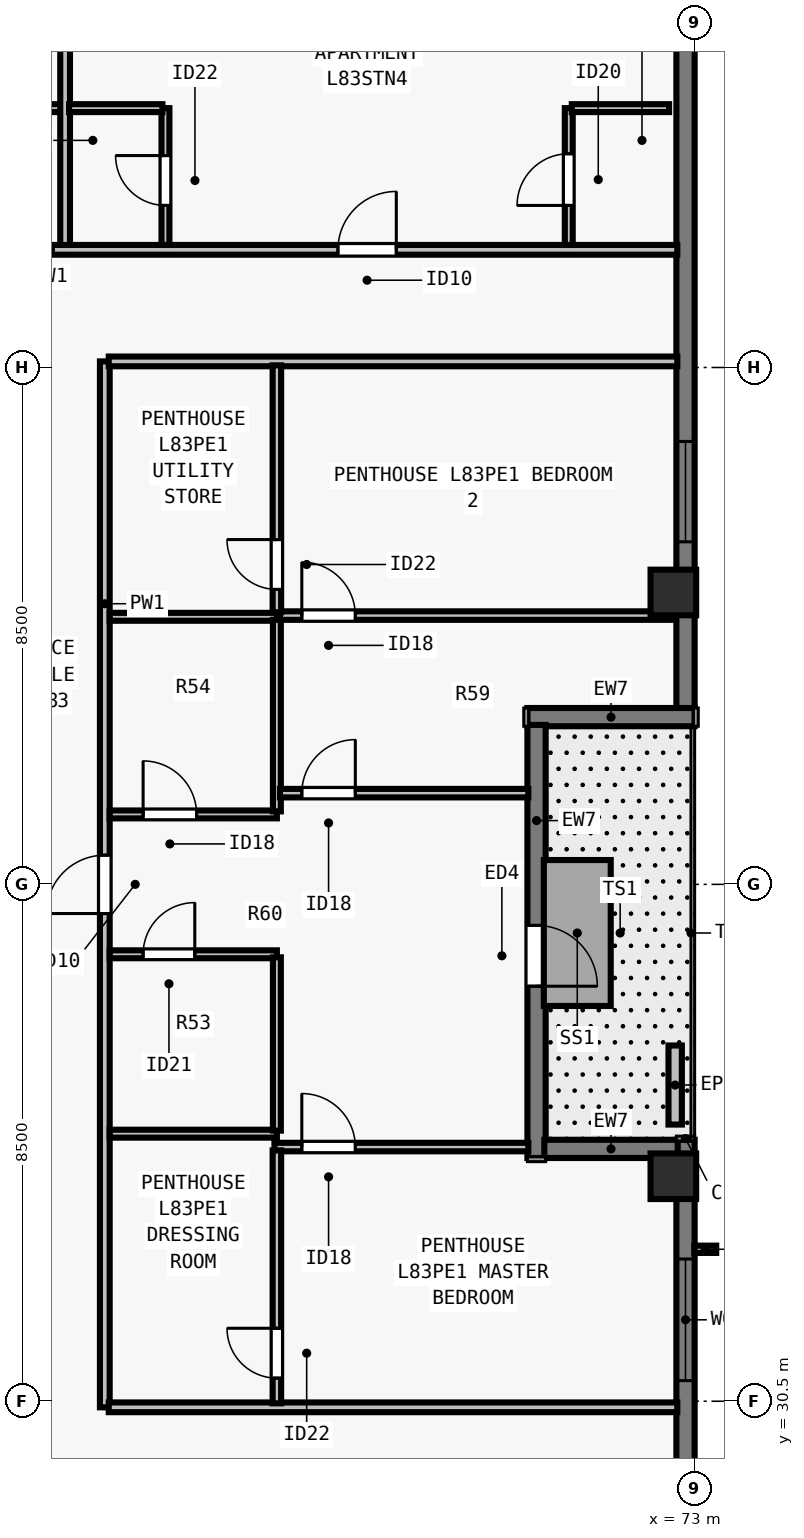
"""IFC4 building model, lengths in metres.
Left out: names, types, materials, properties, quantities, classifications, styles, units other than length and angle.
Written with IfcOpenShell. Run it as: python <this file> out.ifc"""

import sys

from ifc_helpers import new_model, si_unit, direction, frame, frame_2d, origin, origin_2d, place, context, subcontext, project, spatial, rectangle, extrude, element, fill, save


model = new_model("IFC4")
c1 = context("Model", 3, precision=1e-05, world=origin(), true_north=direction((0.0, 1.0)))
c2 = subcontext(c1, "Body", "Model", "MODEL_VIEW")
j1 = project(units=[si_unit("LENGTHUNIT", "METRE"), si_unit("PLANEANGLEUNIT", "RADIAN")], contexts=[c1])
p1 = place(None, origin())
s1 = spatial("IfcSite", under=j1, at=p1, CompositionType="ELEMENT")
p2 = place(p1, origin())
s2 = spatial("IfcBuilding", under=s1, at=p2, CompositionType="ELEMENT")
p3 = place(p2, frame((0.0, 0.0, 301.5)))
s3 = spatial("IfcBuildingStorey", under=s2, at=p3, CompositionType="ELEMENT", Elevation=301.5)
for number, where, z_axis, x_axis in (
    (1, (72.65, 34.2, 0.0), (0.0, 0.0, 1.0), (0.0, 1.0, 0.0)),
    (2, (72.65, 43.8, 0.0), (0.0, 0.0, 1.0), (0.0, 1.0, 0.0)),
):
    element("IfcColumn", number, at=place(p3, frame(where, z_axis=z_axis, x_axis=x_axis)), inside=s3, PredefinedType="COLUMN", context=c2, shape_type="SweptSolid", body=[
        extrude(rectangle(XDim=0.75, YDim=0.75, at=origin_2d()), origin(), (0.0, 0.0, 1.0), 3.5),
    ])
p4 = place(p3, frame((72.85, 34.8, 0.0), z_axis=(0.0, 0.0, 1.0), x_axis=(0.0, -1.0, 0.0)))
e3 = element("IfcWall", 3, at=p4, inside=s3, PredefinedType="SOLIDWALL", context=c2, shape_type="SweptSolid", body=[
    extrude(rectangle(XDim=11.022, YDim=0.3, at=frame_2d((5.511, 0.0))), origin(), (0.0, 0.0, 1.0), 3.29),
])
p5 = place(p4, frame((1.961, 0.0, 0.8)))
e4 = element("IfcOpeningElement", 4, at=p5, cuts=e3, PredefinedType="OPENING", context=c2, shape_type="SweptSolid", body=[
    extrude(rectangle(XDim=2.0, YDim=1.758, at=frame_2d((1.0, 0.879))), frame((0.0, 0.16, 0.0), z_axis=(0.0, -1.0, 0.0), x_axis=(1.0, 0.0, 0.0)), (0.0, 0.0, 1.0), 0.32),
])
p6 = place(p3, frame((72.85, 54.5, 0.0), z_axis=(0.0, 0.0, 1.0), x_axis=(0.0, -1.0, 0.0)))
e5 = element("IfcWall", 5, at=p6, inside=s3, PredefinedType="SOLIDWALL", context=c2, shape_type="SweptSolid", body=[
    extrude(rectangle(XDim=12.622, YDim=0.3, at=frame_2d((6.311, 0.0))), origin(), (0.0, 0.0, 1.0), 3.29),
])
p7 = place(p6, frame((8.217, 0.0, 0.8)))
e6 = element("IfcOpeningElement", 6, at=p7, cuts=e5, PredefinedType="OPENING", context=c2, shape_type="SweptSolid", body=[
    extrude(rectangle(XDim=1.65, YDim=1.758, at=frame_2d((0.825, 0.879))), frame((0.0, 0.16, 0.0), z_axis=(0.0, -1.0, 0.0), x_axis=(1.0, 0.0, 0.0)), (0.0, 0.0, 1.0), 0.32),
])
p8 = place(p3, frame((73.0, 41.75, 0.0), z_axis=(0.0, 0.0, 1.0), x_axis=(-1.0, 0.0, 0.0)))
e7 = element("IfcWall", 7, at=p8, inside=s3, PredefinedType="SOLIDWALL", context=c2, shape_type="SweptSolid", body=[
    extrude(rectangle(XDim=2.75, YDim=0.3, at=frame_2d((1.375, 0.0))), origin(), (0.0, 0.0, 1.0), 3.29),
])
p9 = place(p3, frame((70.4, 41.622, 0.0), z_axis=(0.0, 0.0, 1.0), x_axis=(0.0, -1.0, 0.0)))
e8 = element("IfcWall", 8, at=p9, inside=s3, PredefinedType="SOLIDWALL", context=c2, shape_type="SweptSolid", body=[
    extrude(rectangle(XDim=7.122, YDim=0.3, at=frame_2d((3.561, 0.0))), origin(), (0.0, 0.0, 1.0), 3.29),
])
p10 = place(p9, frame((3.297, 0.0, 0.0)))
e9 = element("IfcOpeningElement", 9, at=p10, cuts=e8, PredefinedType="OPENING", context=c2, shape_type="SweptSolid", body=[
    extrude(rectangle(XDim=1.0, YDim=2.15, at=frame_2d((0.5, 1.075))), frame((0.0, 0.16, 0.0), z_axis=(0.0, -1.0, 0.0), x_axis=(1.0, 0.0, 0.0)), (0.0, 0.0, 1.0), 0.32),
])
p11 = place(p3, frame((70.528, 34.65, 0.0), z_axis=(0.0, 0.0, 1.0), x_axis=(1.0, 0.0, 0.0)))
e10 = element("IfcWall", 10, at=p11, inside=s3, PredefinedType="SOLIDWALL", context=c2, shape_type="SweptSolid", body=[
    extrude(rectangle(XDim=2.194, YDim=0.3, at=frame_2d((1.097, 0.0))), origin(), (0.0, 0.0, 1.0), 3.29),
])
p12 = place(p3, frame((72.68, 35.05, 0.0), z_axis=(0.0, 0.0, 1.0), x_axis=(0.0, 1.0, 0.0)))
e11 = element("IfcWall", 11, at=p12, inside=s3, PredefinedType="PARAPET", context=c2, shape_type="SweptSolid", body=[
    extrude(rectangle(XDim=1.3, YDim=0.22, at=frame_2d((0.65, 0.0))), origin(), (0.0, 0.0, 1.0), 0.55),
])
p13 = place(p3, frame((31.285, 49.435, 0.0), z_axis=(0.0, 0.0, 1.0), x_axis=(1.0, 0.0, 0.0)))
e12 = element("IfcWall", 12, at=p13, inside=s3, PredefinedType="PARTITIONING", context=c2, shape_type="SweptSolid", body=[
    extrude(rectangle(XDim=41.43, YDim=0.16, at=frame_2d((20.715, 0.0))), origin(), (0.0, 0.0, 1.0), 3.009),
])
p14 = place(p13, frame((4.979, 0.0, 0.0)))
e13 = element("IfcOpeningElement", 13, at=p14, cuts=e12, PredefinedType="OPENING", context=c2, shape_type="SweptSolid", body=[
    extrude(rectangle(XDim=0.96, YDim=2.18, at=frame_2d((0.48, 1.09))), frame((0.0, 0.09, 0.0), z_axis=(0.0, -1.0, 0.0), x_axis=(1.0, 0.0, 0.0)), (0.0, 0.0, 1.0), 0.18),
])
p15 = place(p13, frame((15.145, 0.0, 0.0)))
e14 = element("IfcOpeningElement", 14, at=p15, cuts=e12, PredefinedType="OPENING", context=c2, shape_type="SweptSolid", body=[
    extrude(rectangle(XDim=0.96, YDim=2.18, at=frame_2d((0.48, 1.09))), frame((0.0, 0.09, 0.0), z_axis=(0.0, -1.0, 0.0), x_axis=(1.0, 0.0, 0.0)), (0.0, 0.0, 1.0), 0.18),
])
p16 = place(p13, frame((25.435, 0.0, 0.0)))
e15 = element("IfcOpeningElement", 15, at=p16, cuts=e12, PredefinedType="OPENING", context=c2, shape_type="SweptSolid", body=[
    extrude(rectangle(XDim=0.96, YDim=2.18, at=frame_2d((0.48, 1.09))), frame((0.0, 0.09, 0.0), z_axis=(0.0, -1.0, 0.0), x_axis=(1.0, 0.0, 0.0)), (0.0, 0.0, 1.0), 0.18),
])
p17 = place(p13, frame((35.849, 0.0, 0.0)))
e16 = element("IfcOpeningElement", 16, at=p17, cuts=e12, PredefinedType="OPENING", context=c2, shape_type="SweptSolid", body=[
    extrude(rectangle(XDim=0.96, YDim=2.18, at=frame_2d((0.48, 1.09))), frame((0.0, 0.09, 0.0), z_axis=(0.0, -1.0, 0.0), x_axis=(1.0, 0.0, 0.0)), (0.0, 0.0, 1.0), 0.18),
])
p18 = place(p3, frame((63.3, 30.4, 0.0), z_axis=(0.0, 0.0, 1.0), x_axis=(0.0, 1.0, 0.0)))
e17 = element("IfcWall", 17, at=p18, inside=s3, PredefinedType="PARTITIONING", context=c2, shape_type="SweptSolid", body=[
    extrude(rectangle(XDim=17.2, YDim=0.16, at=frame_2d((8.6, 0.0))), origin(), (0.0, 0.0, 1.0), 3.29),
])
p19 = place(p18, frame((8.12, 0.0, 0.0)))
e18 = element("IfcOpeningElement", 18, at=p19, cuts=e17, PredefinedType="OPENING", context=c2, shape_type="SweptSolid", body=[
    extrude(rectangle(XDim=0.96, YDim=2.18, at=frame_2d((0.48, 1.09))), frame((0.0, 0.09, 0.0), z_axis=(0.0, -1.0, 0.0), x_axis=(1.0, 0.0, 0.0)), (0.0, 0.0, 1.0), 0.18),
])
for number, where, z_axis, x_axis in (
    (19, (63.365, 30.4, 0.0), (0.0, 0.0, 1.0), (1.0, 0.0, 0.0)),
    (20, (63.365, 47.6, 0.0), (0.0, 0.0, 1.0), (1.0, 0.0, 0.0)),
):
    element("IfcWall", number, at=place(p3, frame(where, z_axis=z_axis, x_axis=x_axis)), inside=s3, PredefinedType="PARTITIONING", context=c2, shape_type="SweptSolid", body=[
        extrude(rectangle(XDim=9.35, YDim=0.16, at=frame_2d((4.675, 0.0))), origin(), (0.0, 0.0, 1.0), 3.29),
    ])
p20 = place(p3, frame((61.048, 51.765, 0.0), z_axis=(0.0, 0.0, 1.0), x_axis=(1.0, 0.0, 0.0)))
e21 = element("IfcWall", 21, at=p20, inside=s3, PredefinedType="PLUMBINGWALL", context=c2, shape_type="SweptSolid", body=[
    extrude(rectangle(XDim=1.6, YDim=0.13, at=frame_2d((0.8, 0.0))), origin(), (0.0, 0.0, 1.0), 3.29),
])
p21 = place(p3, frame((62.647, 49.515, 0.0), z_axis=(0.0, 0.0, 1.0), x_axis=(0.0, 1.0, 0.0)))
e22 = element("IfcWall", 22, at=p21, inside=s3, PredefinedType="PARTITIONING", context=c2, shape_type="SweptSolid", body=[
    extrude(rectangle(XDim=10.185, YDim=0.16, at=frame_2d((5.093, 0.0))), origin(), (0.0, 0.0, 1.0), 2.653),
])
p22 = place(p3, frame((64.298, 49.515, 0.0), z_axis=(0.0, 0.0, 1.0), x_axis=(0.0, 1.0, 0.0)))
e23 = element("IfcWall", 23, at=p22, inside=s3, PredefinedType="PLUMBINGWALL", context=c2, shape_type="SweptSolid", body=[
    extrude(rectangle(XDim=2.25, YDim=0.13, at=frame_2d((1.125, 0.0))), origin(), (0.0, 0.0, 1.0), 3.29),
])
p23 = place(p22, frame((0.65, 0.0, 0.0)))
e24 = element("IfcOpeningElement", 24, at=p23, cuts=e23, PredefinedType="OPENING", context=c2, shape_type="SweptSolid", body=[
    extrude(rectangle(XDim=0.82, YDim=2.1, at=frame_2d((0.41, 1.05))), frame((0.0, 0.075, 0.0), z_axis=(0.0, -1.0, 0.0), x_axis=(1.0, 0.0, 0.0)), (0.0, 0.0, 1.0), 0.15),
])
p24 = place(p3, frame((62.712, 51.765, 0.0), z_axis=(0.0, 0.0, 1.0), x_axis=(1.0, 0.0, 0.0)))
e25 = element("IfcWall", 25, at=p24, inside=s3, PredefinedType="PLUMBINGWALL", context=c2, shape_type="SweptSolid", body=[
    extrude(rectangle(XDim=1.535, YDim=0.13, at=frame_2d((0.768, 0.0))), origin(), (0.0, 0.0, 1.0), 3.29),
])
p25 = place(p3, frame((70.93, 49.515, 0.0), z_axis=(0.0, 0.0, 1.0), x_axis=(0.0, 1.0, 0.0)))
e26 = element("IfcWall", 26, at=p25, inside=s3, PredefinedType="PLUMBINGWALL", context=c2, shape_type="SweptSolid", body=[
    extrude(rectangle(XDim=2.25, YDim=0.13, at=frame_2d((1.125, 0.0))), origin(), (0.0, 0.0, 1.0), 3.29),
])
p26 = place(p25, frame((0.65, 0.0, 0.0)))
e27 = element("IfcOpeningElement", 27, at=p26, cuts=e26, PredefinedType="OPENING", context=c2, shape_type="SweptSolid", body=[
    extrude(rectangle(XDim=0.85, YDim=2.1, at=frame_2d((0.425, 1.05))), frame((0.0, 0.075, 0.0), z_axis=(0.0, -1.0, 0.0), x_axis=(1.0, 0.0, 0.0)), (0.0, 0.0, 1.0), 0.15),
])
p27 = place(p3, frame((70.98, 51.765, 0.0), z_axis=(0.0, 0.0, 1.0), x_axis=(1.0, 0.0, 0.0)))
e28 = element("IfcWall", 28, at=p27, inside=s3, PredefinedType="PLUMBINGWALL", context=c2, shape_type="SweptSolid", body=[
    extrude(rectangle(XDim=1.6, YDim=0.13, at=frame_2d((0.8, 0.0))), origin(), (0.0, 0.0, 1.0), 3.29),
])
p28 = place(p3, frame((63.38, 34.9, 0.0), z_axis=(0.0, 0.0, 1.0), x_axis=(1.0, 0.0, 0.0)))
e29 = element("IfcWall", 29, at=p28, inside=s3, PredefinedType="PLUMBINGWALL", context=c2, shape_type="SweptSolid", body=[
    extrude(rectangle(XDim=2.75, YDim=0.13, at=frame_2d((1.375, 0.0))), origin(), (0.0, 0.0, 1.0), 3.29),
])
p29 = place(p3, frame((63.38, 37.85, 0.0), z_axis=(0.0, 0.0, 1.0), x_axis=(1.0, 0.0, 0.0)))
e30 = element("IfcWall", 30, at=p29, inside=s3, PredefinedType="PLUMBINGWALL", context=c2, shape_type="SweptSolid", body=[
    extrude(rectangle(XDim=2.75, YDim=0.13, at=frame_2d((1.375, 0.0))), origin(), (0.0, 0.0, 1.0), 3.29),
])
p30 = place(p29, frame((0.55, 0.0, 0.0)))
e31 = element("IfcOpeningElement", 31, at=p30, cuts=e30, PredefinedType="OPENING", context=c2, shape_type="SweptSolid", body=[
    extrude(rectangle(XDim=0.85, YDim=2.08, at=frame_2d((0.425, 1.04))), frame((0.0, 0.075, 0.0), z_axis=(0.0, -1.0, 0.0), x_axis=(1.0, 0.0, 0.0)), (0.0, 0.0, 1.0), 0.15),
])
p31 = place(p3, frame((66.13, 34.95, 0.0), z_axis=(0.0, 0.0, 1.0), x_axis=(0.0, 1.0, 0.0)))
e32 = element("IfcWall", 32, at=p31, inside=s3, PredefinedType="PLUMBINGWALL", context=c2, shape_type="SweptSolid", body=[
    extrude(rectangle(XDim=2.85, YDim=0.13, at=frame_2d((1.425, 0.0))), origin(), (0.0, 0.0, 1.0), 3.29),
])
p32 = place(p3, frame((63.38, 43.4, 0.0), z_axis=(0.0, 0.0, 1.0), x_axis=(1.0, 0.0, 0.0)))
e33 = element("IfcWall", 33, at=p32, inside=s3, PredefinedType="PLUMBINGWALL", context=c2, shape_type="SweptSolid", body=[
    extrude(rectangle(XDim=2.75, YDim=0.13, at=frame_2d((1.375, 0.0))), origin(), (0.0, 0.0, 1.0), 3.29),
])
p33 = place(p3, frame((63.38, 40.15, 0.0), z_axis=(0.0, 0.0, 1.0), x_axis=(1.0, 0.0, 0.0)))
e34 = element("IfcWall", 34, at=p33, inside=s3, PredefinedType="PLUMBINGWALL", context=c2, shape_type="SweptSolid", body=[
    extrude(rectangle(XDim=2.75, YDim=0.13, at=frame_2d((1.375, 0.0))), origin(), (0.0, 0.0, 1.0), 3.29),
])
p34 = place(p33, frame((0.55, 0.0, 0.0)))
e35 = element("IfcOpeningElement", 35, at=p34, cuts=e34, PredefinedType="OPENING", context=c2, shape_type="SweptSolid", body=[
    extrude(rectangle(XDim=0.88, YDim=2.1, at=frame_2d((0.44, 1.05))), frame((0.0, 0.075, 0.0), z_axis=(0.0, -1.0, 0.0), x_axis=(1.0, 0.0, 0.0)), (0.0, 0.0, 1.0), 0.15),
])
p35 = place(p3, frame((66.13, 40.2, 0.0), z_axis=(0.0, 0.0, 1.0), x_axis=(0.0, 1.0, 0.0)))
e36 = element("IfcWall", 36, at=p35, inside=s3, PredefinedType="PLUMBINGWALL", context=c2, shape_type="SweptSolid", body=[
    extrude(rectangle(XDim=3.15, YDim=0.13, at=frame_2d((1.575, 0.0))), origin(), (0.0, 0.0, 1.0), 3.29),
])
p36 = place(p3, frame((66.09, 34.68, 0.0), z_axis=(0.0, 0.0, 1.0), x_axis=(1.0, 0.0, 0.0)))
e37 = element("IfcWall", 37, at=p36, inside=s3, PredefinedType="PARTITIONING", context=c2, shape_type="SweptSolid", body=[
    extrude(rectangle(XDim=4.175, YDim=0.14, at=frame_2d((2.087, 0.0))), origin(), (0.0, 0.0, 1.0), 3.29),
])
p37 = place(p36, frame((0.45, 0.0, 0.0)))
e38 = element("IfcOpeningElement", 38, at=p37, cuts=e37, PredefinedType="OPENING", context=c2, shape_type="SweptSolid", body=[
    extrude(rectangle(XDim=0.88, YDim=2.1, at=frame_2d((0.44, 1.05))), frame((0.0, 0.08, 0.0), z_axis=(0.0, -1.0, 0.0), x_axis=(1.0, 0.0, 0.0)), (0.0, 0.0, 1.0), 0.16),
])
p38 = place(p3, frame((66.13, 30.465, 0.0), z_axis=(0.0, 0.0, 1.0), x_axis=(0.0, 1.0, 0.0)))
e39 = element("IfcWall", 39, at=p38, inside=s3, PredefinedType="PARTITIONING", context=c2, shape_type="SweptSolid", body=[
    extrude(rectangle(XDim=4.16, YDim=0.14, at=frame_2d((2.08, 0.0))), origin(), (0.0, 0.0, 1.0), 3.29),
])
p39 = place(p38, frame((0.415, 0.0, 0.0)))
e40 = element("IfcOpeningElement", 40, at=p39, cuts=e39, PredefinedType="OPENING", context=c2, shape_type="SweptSolid", body=[
    extrude(rectangle(XDim=0.82, YDim=2.1, at=frame_2d((0.41, 1.05))), frame((0.0, 0.08, 0.0), z_axis=(0.0, -1.0, 0.0), x_axis=(1.0, 0.0, 0.0)), (0.0, 0.0, 1.0), 0.16),
])
p40 = place(p3, frame((66.18, 43.42, 0.0), z_axis=(0.0, 0.0, 1.0), x_axis=(1.0, 0.0, 0.0)))
e41 = element("IfcWall", 41, at=p40, inside=s3, PredefinedType="PARTITIONING", context=c2, shape_type="SweptSolid", body=[
    extrude(rectangle(XDim=6.44, YDim=0.14, at=frame_2d((3.22, 0.0))), origin(), (0.0, 0.0, 1.0), 3.29),
])
p41 = place(p40, frame((0.36, 0.0, 0.0)))
e42 = element("IfcOpeningElement", 42, at=p41, cuts=e41, PredefinedType="OPENING", context=c2, shape_type="SweptSolid", body=[
    extrude(rectangle(XDim=0.88, YDim=2.1, at=frame_2d((0.44, 1.05))), frame((0.0, 0.08, 0.0), z_axis=(0.0, -1.0, 0.0), x_axis=(1.0, 0.0, 0.0)), (0.0, 0.0, 1.0), 0.16),
])
p42 = place(p3, frame((66.13, 43.475, 0.0), z_axis=(0.0, 0.0, 1.0), x_axis=(0.0, 1.0, 0.0)))
e43 = element("IfcWall", 43, at=p42, inside=s3, PredefinedType="PARTITIONING", context=c2, shape_type="SweptSolid", body=[
    extrude(rectangle(XDim=4.06, YDim=0.14, at=frame_2d((2.03, 0.0))), origin(), (0.0, 0.0, 1.0), 3.29),
])
p43 = place(p42, frame((0.375, 0.0, 0.0)))
e44 = element("IfcOpeningElement", 44, at=p43, cuts=e43, PredefinedType="OPENING", context=c2, shape_type="SweptSolid", body=[
    extrude(rectangle(XDim=0.82, YDim=2.1, at=frame_2d((0.41, 1.05))), frame((0.0, 0.08, 0.0), z_axis=(0.0, -1.0, 0.0), x_axis=(1.0, 0.0, 0.0)), (0.0, 0.0, 1.0), 0.16),
])
p44 = place(p3, frame((66.18, 40.5, 0.0), z_axis=(0.0, 0.0, 1.0), x_axis=(1.0, 0.0, 0.0)))
e45 = element("IfcWall", 45, at=p44, inside=s3, PredefinedType="PARTITIONING", context=c2, shape_type="SweptSolid", body=[
    extrude(rectangle(XDim=4.085, YDim=0.14, at=frame_2d((2.042, 0.0))), origin(), (0.0, 0.0, 1.0), 3.29),
])
p45 = place(p44, frame((0.36, 0.0, 0.0)))
e46 = element("IfcOpeningElement", 46, at=p45, cuts=e45, PredefinedType="OPENING", context=c2, shape_type="SweptSolid", body=[
    extrude(rectangle(XDim=0.88, YDim=2.1, at=frame_2d((0.44, 1.05))), frame((0.0, 0.08, 0.0), z_axis=(0.0, -1.0, 0.0), x_axis=(1.0, 0.0, 0.0)), (0.0, 0.0, 1.0), 0.16),
])
p46 = place(p5, origin())
e47 = element("IfcWindow", 47, at=p46, inside=s3, PartitioningType="SINGLE_PANEL", PredefinedType="WINDOW", context=c2, shape_type="SweptSolid", body=[
    extrude(rectangle(XDim=2.0, YDim=1.758, at=frame_2d((1.0, 0.879))), frame((0.0, -0.05, 0.0), z_axis=(0.0, -1.0, 0.0), x_axis=(1.0, 0.0, 0.0)), (0.0, 0.0, 1.0), 0.06),
])
fill(e4, e47)
p47 = place(p7, origin())
e48 = element("IfcWindow", 48, at=p47, inside=s3, PartitioningType="SINGLE_PANEL", PredefinedType="WINDOW", context=c2, shape_type="SweptSolid", body=[
    extrude(rectangle(XDim=1.65, YDim=1.758, at=frame_2d((0.825, 0.879))), frame((0.0, -0.05, 0.0), z_axis=(0.0, -1.0, 0.0), x_axis=(1.0, 0.0, 0.0)), (0.0, 0.0, 1.0), 0.06),
])
fill(e6, e48)
p48 = place(p10, origin())
e49 = element("IfcDoor", 49, at=p48, inside=s3, OperationType="SINGLE_SWING_RIGHT", PredefinedType="DOOR", context=c2, shape_type="SweptSolid", body=[
    extrude(rectangle(XDim=1.0, YDim=2.15, at=frame_2d((0.5, 1.075))), frame((0.0, 0.025, 0.0), z_axis=(0.0, -1.0, 0.0), x_axis=(1.0, 0.0, 0.0)), (0.0, 0.0, 1.0), 0.05),
])
fill(e9, e49)
p49 = place(p23, origin())
e50 = element("IfcDoor", 50, at=p49, inside=s3, OperationType="SINGLE_SWING_RIGHT", PredefinedType="DOOR", context=c2, shape_type="SweptSolid", body=[
    extrude(rectangle(XDim=0.82, YDim=2.1, at=frame_2d((0.41, 1.05))), frame((0.0, 0.025, 0.0), z_axis=(0.0, -1.0, 0.0), x_axis=(1.0, 0.0, 0.0)), (0.0, 0.0, 1.0), 0.05),
])
fill(e24, e50)
p50 = place(p26, origin())
e51 = element("IfcDoor", 51, at=p50, inside=s3, OperationType="SINGLE_SWING_LEFT", PredefinedType="DOOR", context=c2, shape_type="SweptSolid", body=[
    extrude(rectangle(XDim=0.85, YDim=2.1, at=frame_2d((0.425, 1.05))), frame((0.0, 0.025, 0.0), z_axis=(0.0, -1.0, 0.0), x_axis=(1.0, 0.0, 0.0)), (0.0, 0.0, 1.0), 0.05),
])
fill(e27, e51)
p51 = place(p17, origin())
e52 = element("IfcDoor", 52, at=p51, inside=s3, OperationType="SINGLE_SWING_RIGHT", PredefinedType="DOOR", context=c2, shape_type="SweptSolid", body=[
    extrude(rectangle(XDim=0.96, YDim=2.18, at=frame_2d((0.48, 1.09))), frame((0.0, 0.025, 0.0), z_axis=(0.0, -1.0, 0.0), x_axis=(1.0, 0.0, 0.0)), (0.0, 0.0, 1.0), 0.05),
])
fill(e16, e52)
p52 = place(p30, origin())
e53 = element("IfcDoor", 53, at=p52, inside=s3, OperationType="SINGLE_SWING_RIGHT", PredefinedType="DOOR", context=c2, shape_type="SweptSolid", body=[
    extrude(rectangle(XDim=0.85, YDim=2.08, at=frame_2d((0.425, 1.04))), frame((0.0, 0.025, 0.0), z_axis=(0.0, -1.0, 0.0), x_axis=(1.0, 0.0, 0.0)), (0.0, 0.0, 1.0), 0.05),
])
fill(e31, e53)
p53 = place(p34, origin())
e54 = element("IfcDoor", 54, at=p53, inside=s3, OperationType="SINGLE_SWING_LEFT", PredefinedType="DOOR", context=c2, shape_type="SweptSolid", body=[
    extrude(rectangle(XDim=0.88, YDim=2.1, at=frame_2d((0.44, 1.05))), frame((0.0, 0.025, 0.0), z_axis=(0.0, -1.0, 0.0), x_axis=(1.0, 0.0, 0.0)), (0.0, 0.0, 1.0), 0.05),
])
fill(e35, e54)
p54 = place(p39, origin())
e55 = element("IfcDoor", 55, at=p54, inside=s3, OperationType="SINGLE_SWING_RIGHT", PredefinedType="DOOR", context=c2, shape_type="SweptSolid", body=[
    extrude(rectangle(XDim=0.82, YDim=2.1, at=frame_2d((0.41, 1.05))), frame((0.0, 0.025, 0.0), z_axis=(0.0, -1.0, 0.0), x_axis=(1.0, 0.0, 0.0)), (0.0, 0.0, 1.0), 0.05),
])
fill(e40, e55)
p55 = place(p37, origin())
e56 = element("IfcDoor", 56, at=p55, inside=s3, OperationType="SINGLE_SWING_LEFT", PredefinedType="DOOR", context=c2, shape_type="SweptSolid", body=[
    extrude(rectangle(XDim=0.88, YDim=2.1, at=frame_2d((0.44, 1.05))), frame((0.0, 0.025, 0.0), z_axis=(0.0, -1.0, 0.0), x_axis=(1.0, 0.0, 0.0)), (0.0, 0.0, 1.0), 0.05),
])
fill(e38, e56)
p56 = place(p43, origin())
e57 = element("IfcDoor", 57, at=p56, inside=s3, OperationType="SINGLE_SWING_RIGHT", PredefinedType="DOOR", context=c2, shape_type="SweptSolid", body=[
    extrude(rectangle(XDim=0.82, YDim=2.1, at=frame_2d((0.41, 1.05))), frame((0.0, 0.025, 0.0), z_axis=(0.0, -1.0, 0.0), x_axis=(1.0, 0.0, 0.0)), (0.0, 0.0, 1.0), 0.05),
])
fill(e44, e57)
p57 = place(p41, origin())
e58 = element("IfcDoor", 58, at=p57, inside=s3, OperationType="SINGLE_SWING_LEFT", PredefinedType="DOOR", context=c2, shape_type="SweptSolid", body=[
    extrude(rectangle(XDim=0.88, YDim=2.1, at=frame_2d((0.44, 1.05))), frame((0.0, 0.025, 0.0), z_axis=(0.0, -1.0, 0.0), x_axis=(1.0, 0.0, 0.0)), (0.0, 0.0, 1.0), 0.05),
])
fill(e42, e58)
p58 = place(p45, origin())
e59 = element("IfcDoor", 59, at=p58, inside=s3, OperationType="SINGLE_SWING_RIGHT", PredefinedType="DOOR", context=c2, shape_type="SweptSolid", body=[
    extrude(rectangle(XDim=0.88, YDim=2.1, at=frame_2d((0.44, 1.05))), frame((0.0, 0.025, 0.0), z_axis=(0.0, -1.0, 0.0), x_axis=(1.0, 0.0, 0.0)), (0.0, 0.0, 1.0), 0.05),
])
fill(e46, e59)
p59 = place(p19, origin())
e60 = element("IfcDoor", 60, at=p59, inside=s3, OperationType="SINGLE_SWING_LEFT", PredefinedType="DOOR", context=c2, shape_type="SweptSolid", body=[
    extrude(rectangle(XDim=0.96, YDim=2.18, at=frame_2d((0.48, 1.09))), frame((0.0, 0.025, 0.0), z_axis=(0.0, -1.0, 0.0), x_axis=(1.0, 0.0, 0.0)), (0.0, 0.0, 1.0), 0.05),
])
fill(e18, e60)
save(model, sys.argv[1])
